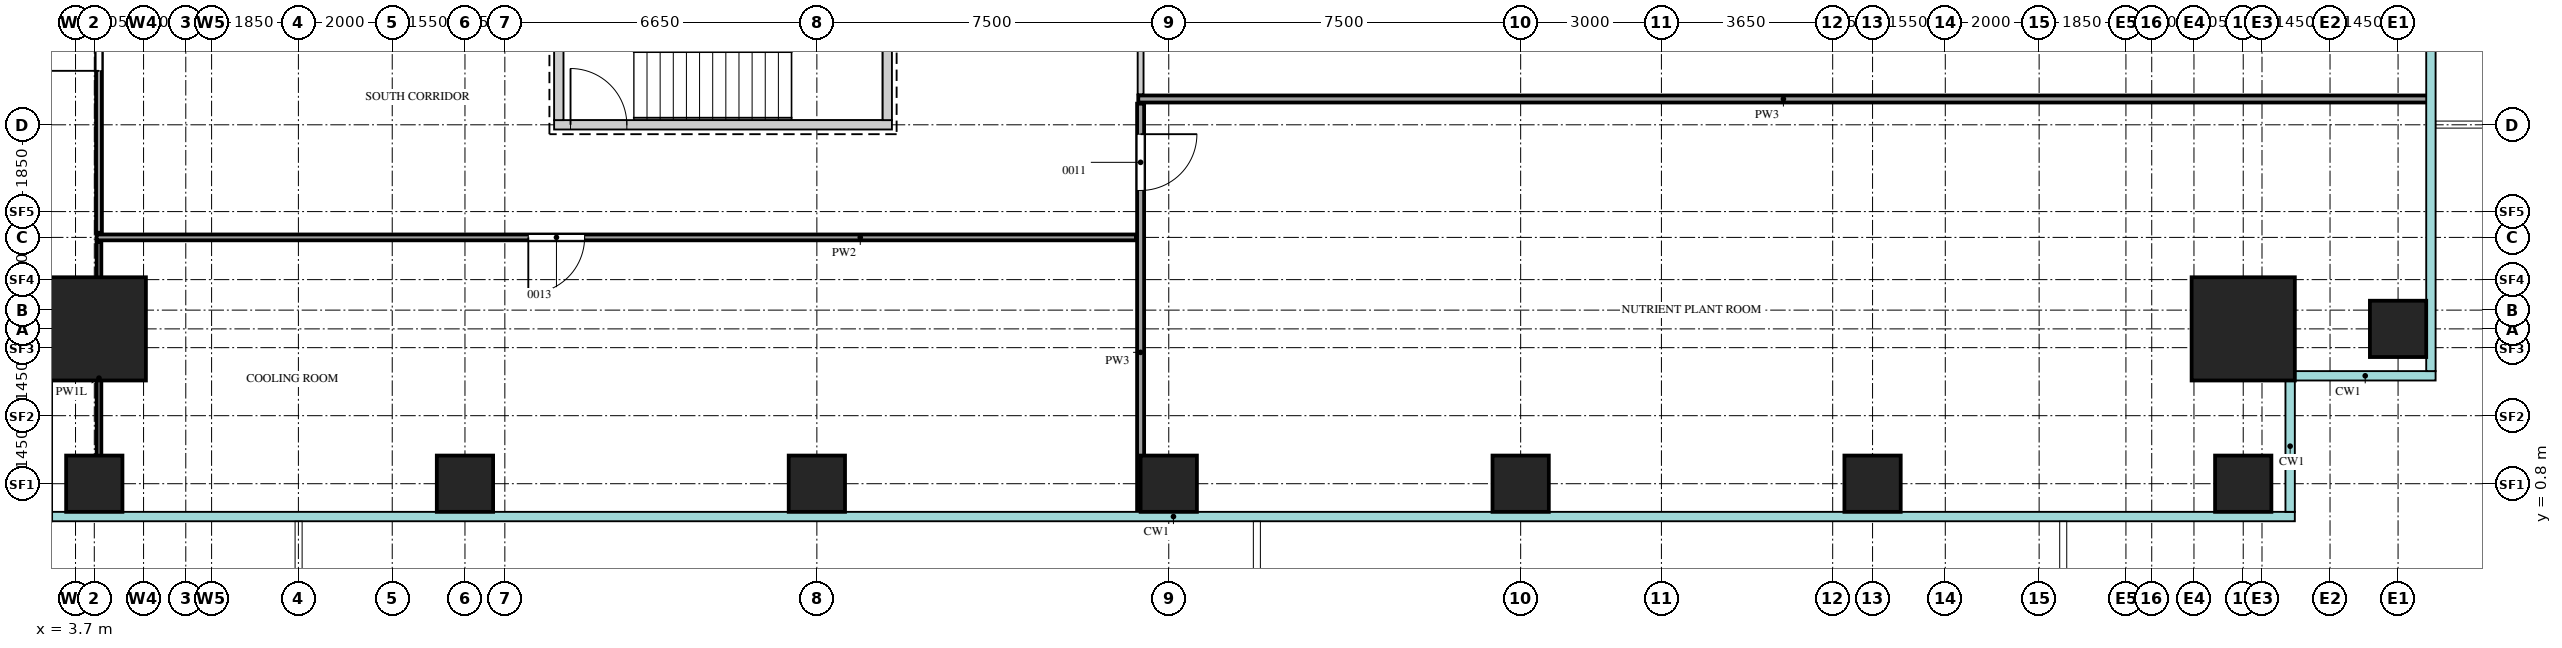
"""IFC4 building model, lengths in metres.
Left out: names, types, materials, properties, quantities, classifications, styles, units other than length and angle.
Written with IfcOpenShell. Run it as: python <this file> out.ifc"""

import sys

from ifc_helpers import new_model, si_unit, direction, frame, frame_2d, origin, origin_2d, place, context, subcontext, project, spatial, rectangle, extrude, source, transform, mapped, element, fill, save


model = new_model("IFC4")
c1 = context("Model", 3, precision=1e-05, world=origin(), true_north=direction((0.0, 1.0)))
c2 = subcontext(c1, "Body", "Model", "MODEL_VIEW")
j1 = project(units=[si_unit("LENGTHUNIT", "METRE"), si_unit("PLANEANGLEUNIT", "RADIAN")], contexts=[c1])
p1 = place(None, origin())
s1 = spatial("IfcSite", under=j1, at=p1, CompositionType="ELEMENT")
p2 = place(p1, origin())
s2 = spatial("IfcBuilding", under=s1, at=p2, CompositionType="ELEMENT")
p3 = place(p2, frame((0.0, 0.0, 82.5)))
s3 = spatial("IfcBuildingStorey", under=s2, at=p3, CompositionType="ELEMENT", Elevation=82.5)
m1 = source(origin(), c2, "Body", "SweptSolid", [
    extrude(rectangle(XDim=7.2, YDim=0.2, at=frame_2d((3.6, 0.0))), origin(), (0.0, 0.0, 1.0), 4.2),
])
p4 = place(p3, frame((13.9, 8.45, 0.0), z_axis=(0.0, 0.0, 1.0), x_axis=(1.0, 0.0, 0.0)))
e1 = element("IfcWall", 1, at=p4, inside=s3, PredefinedType="SHEAR", context=c2, shape_type="MappedRepresentation", body=[
    mapped(m1, transform((0.0, 0.0, 0.0))),
])
m2 = source(origin(), c2, "Body", "SweptSolid", [
    extrude(rectangle(XDim=1.2, YDim=2.1, at=frame_2d((0.6, 1.05))), frame((0.0, 0.11, 0.0), z_axis=(0.0, -1.0, 0.0), x_axis=(1.0, 0.0, 0.0)), (0.0, 0.0, 1.0), 0.22),
])
p5 = place(p4, frame((0.35, 0.0, 0.0)))
e2 = element("IfcOpeningElement", 2, at=p5, cuts=e1, PredefinedType="OPENING", context=c2, shape_type="MappedRepresentation", body=[
    mapped(m2, transform((0.0, 0.0, 0.0))),
])
m3 = source(origin(), c2, "Body", "SweptSolid", [
    extrude(rectangle(XDim=3.35, YDim=0.2, at=frame_2d((1.675, 0.0))), origin(), (0.0, 0.0, 1.0), 4.2),
])
for number, where, z_axis, x_axis in (
    (3, (21.0, 8.55, 0.0), (0.0, 0.0, 1.0), (0.0, 1.0, 0.0)),
    (4, (14.0, 8.55, 0.0), (0.0, 0.0, 1.0), (0.0, 1.0, 0.0)),
):
    element("IfcWall", number, at=place(p3, frame(where, z_axis=z_axis, x_axis=x_axis)), inside=s3, PredefinedType="SHEAR", context=c2, shape_type="MappedRepresentation", body=[
        mapped(m3, transform((0.0, 0.0, 0.0))),
    ])
m4 = source(origin(), c2, "Body", "SweptSolid", [
    extrude(rectangle(XDim=2.2, YDim=2.2, at=origin_2d()), origin(), (0.0, 0.0, 1.0), 4.5),
])
for number, where, z_axis, x_axis in (
    (5, (49.9, 4.1, 0.0), (0.0, 0.0, 1.0), (1.0, 0.0, 0.0)),
    (6, (4.1, 4.1, 0.0), (0.0, 0.0, 1.0), (1.0, 0.0, 0.0)),
):
    element("IfcColumn", number, at=place(p3, frame(where, z_axis=z_axis, x_axis=x_axis)), inside=s3, PredefinedType="COLUMN", context=c2, shape_type="MappedRepresentation", body=[
        mapped(m4, transform((0.0, 0.0, 0.0))),
    ])
m5 = source(origin(), c2, "Body", "SweptSolid", [
    extrude(rectangle(XDim=1.2, YDim=1.2, at=origin_2d()), origin(), (0.0, 0.0, 1.0), 4.2),
])
for number, where, z_axis, x_axis in (
    (7, (4.1, 0.8, 0.0), (0.0, 0.0, 1.0), (1.0, 0.0, 0.0)),
    (8, (12.0, 0.8, 0.0), (0.0, 0.0, 1.0), (1.0, 0.0, 0.0)),
    (9, (19.5, 0.8, 0.0), (0.0, 0.0, 1.0), (1.0, 0.0, 0.0)),
    (10, (27.0, 0.8, 0.0), (0.0, 0.0, 1.0), (1.0, 0.0, 0.0)),
    (11, (34.5, 0.8, 0.0), (0.0, 0.0, 1.0), (1.0, 0.0, 0.0)),
    (12, (42.0, 0.8, 0.0), (0.0, 0.0, 1.0), (1.0, 0.0, 0.0)),
    (13, (49.9, 0.8, 0.0), (0.0, 0.0, 1.0), (1.0, 0.0, 0.0)),
    (14, (53.2, 4.1, 0.0), (0.0, 0.0, 1.0), (1.0, 0.0, 0.0)),
):
    element("IfcColumn", number, at=place(p3, frame(where, z_axis=z_axis, x_axis=x_axis)), inside=s3, PredefinedType="COLUMN", context=c2, shape_type="MappedRepresentation", body=[
        mapped(m5, transform((0.0, 0.0, 0.0))),
    ])
m6 = source(origin(), c2, "Body", "SweptSolid", [
    extrude(rectangle(XDim=5.8, YDim=0.1, at=frame_2d((2.9, 0.0))), origin(), (0.0, 0.0, 1.0), 3.6),
])
p6 = place(p3, frame((4.2, 0.15, 0.0), z_axis=(0.0, 0.0, 1.0), x_axis=(0.0, 1.0, 0.0)))
e15 = element("IfcWall", 15, at=p6, inside=s3, PredefinedType="PARTITIONING", context=c2, shape_type="MappedRepresentation", body=[
    mapped(m6, transform((0.0, 0.0, 0.0))),
])
m7 = source(origin(), c2, "Body", "SweptSolid", [
    extrude(rectangle(XDim=8.75, YDim=0.15, at=frame_2d((4.375, 0.0))), origin(), (0.0, 0.0, 1.0), 4.3),
])
p7 = place(p3, frame((26.4, 0.15, 0.0), z_axis=(0.0, 0.0, 1.0), x_axis=(0.0, 1.0, 0.0)))
e16 = element("IfcWall", 16, at=p7, inside=s3, PredefinedType="PARTITIONING", context=c2, shape_type="MappedRepresentation", body=[
    mapped(m7, transform((0.0, 0.0, 0.0))),
])
m8 = source(origin(), c2, "Body", "SweptSolid", [
    extrude(rectangle(XDim=1.2, YDim=2.1, at=frame_2d((0.6, 1.05))), frame((0.0, 0.085, 0.0), z_axis=(0.0, -1.0, 0.0), x_axis=(1.0, 0.0, 0.0)), (0.0, 0.0, 1.0), 0.17),
])
p8 = place(p7, frame((6.9, 0.0, 0.0)))
e17 = element("IfcOpeningElement", 17, at=p8, cuts=e16, PredefinedType="OPENING", context=c2, shape_type="MappedRepresentation", body=[
    mapped(m8, transform((0.0, 0.0, 0.0))),
])
m9 = source(origin(), c2, "Body", "SweptSolid", [
    extrude(rectangle(XDim=22.15, YDim=0.125, at=frame_2d((11.075, 0.0))), origin(), (0.0, 0.0, 1.0), 4.3),
])
p9 = place(p3, frame((4.15, 6.05, 0.0), z_axis=(0.0, 0.0, 1.0), x_axis=(1.0, 0.0, 0.0)))
e18 = element("IfcWall", 18, at=p9, inside=s3, PredefinedType="PARTITIONING", context=c2, shape_type="MappedRepresentation", body=[
    mapped(m9, transform((0.0, 0.0, 0.0))),
])
m10 = source(origin(), c2, "Body", "SweptSolid", [
    extrude(rectangle(XDim=1.2, YDim=2.1, at=frame_2d((0.6, 1.05))), frame((0.0, 0.073, 0.0), z_axis=(0.0, -1.0, 0.0), x_axis=(1.0, 0.0, 0.0)), (0.0, 0.0, 1.0), 0.145),
])
p10 = place(p9, frame((9.2, 0.0, 0.0)))
e19 = element("IfcOpeningElement", 19, at=p10, cuts=e18, PredefinedType="OPENING", context=c2, shape_type="MappedRepresentation", body=[
    mapped(m10, transform((0.0, 0.0, 0.0))),
])
m11 = source(origin(), c2, "Body", "SweptSolid", [
    extrude(rectangle(XDim=41.8, YDim=0.125, at=frame_2d((20.9, 0.0))), origin(), (0.0, 0.0, 1.0), 4.3),
])
p11 = place(p3, frame((4.2, 6.15, 0.0), z_axis=(0.0, 0.0, 1.0), x_axis=(0.0, 1.0, 0.0)))
e20 = element("IfcWall", 20, at=p11, inside=s3, PredefinedType="PARTITIONING", context=c2, shape_type="MappedRepresentation", body=[
    mapped(m11, transform((0.0, 0.0, 0.0))),
])
p12 = place(p11, frame((3.45, 0.0, 0.0)))
e21 = element("IfcOpeningElement", 21, at=p12, cuts=e20, PredefinedType="OPENING", context=c2, shape_type="MappedRepresentation", body=[
    mapped(m10, transform((0.0, 0.0, 0.0))),
])
m12 = source(origin(), c2, "Body", "SweptSolid", [
    extrude(rectangle(XDim=0.9, YDim=2.1, at=frame_2d((0.45, 1.05))), frame((0.0, 0.073, 0.0), z_axis=(0.0, -1.0, 0.0), x_axis=(1.0, 0.0, 0.0)), (0.0, 0.0, 1.0), 0.145),
])
p13 = place(p11, frame((13.25, 0.0, 0.0)))
e22 = element("IfcOpeningElement", 22, at=p13, cuts=e20, PredefinedType="OPENING", context=c2, shape_type="MappedRepresentation", body=[
    mapped(m12, transform((0.0, 0.0, 0.0))),
])
p14 = place(p11, frame((30.35, 0.0, 0.0)))
e23 = element("IfcOpeningElement", 23, at=p14, cuts=e20, PredefinedType="OPENING", context=c2, shape_type="MappedRepresentation", body=[
    mapped(m12, transform((0.0, 0.0, 0.0))),
])
m13 = source(origin(), c2, "Body", "SweptSolid", [
    extrude(rectangle(XDim=27.5, YDim=0.15, at=frame_2d((13.75, 0.0))), origin(), (0.0, 0.0, 1.0), 4.3),
])
p15 = place(p3, frame((26.35, 9.0, 0.0), z_axis=(0.0, 0.0, 1.0), x_axis=(1.0, 0.0, 0.0)))
e24 = element("IfcWall", 24, at=p15, inside=s3, PredefinedType="PARTITIONING", context=c2, shape_type="MappedRepresentation", body=[
    mapped(m13, transform((0.0, 0.0, 0.0))),
])
m14 = source(origin(), c2, "Body", "SweptSolid", [
    extrude(rectangle(XDim=26.1, YDim=0.125, at=frame_2d((13.05, 0.0))), origin(), (0.0, 0.0, 1.0), 4.3),
])
p16 = place(p3, frame((26.4, 9.1, 0.0), z_axis=(0.0, 0.0, 1.0), x_axis=(0.0, 1.0, 0.0)))
e25 = element("IfcWall", 25, at=p16, inside=s3, PredefinedType="PARTITIONING", context=c2, shape_type="MappedRepresentation", body=[
    mapped(m14, transform((0.0, 0.0, 0.0))),
])
p17 = place(p16, frame((5.8, 0.0, 0.0)))
e26 = element("IfcOpeningElement", 26, at=p17, cuts=e25, PredefinedType="OPENING", context=c2, shape_type="MappedRepresentation", body=[
    mapped(m10, transform((0.0, 0.0, 0.0))),
])
m15 = source(origin(), c2, "Body", "SweptSolid", [
    extrude(rectangle(XDim=1.2, YDim=2.1, at=frame_2d((0.6, 1.05))), frame((0.0, 0.025, 0.0), z_axis=(0.0, -1.0, 0.0), x_axis=(1.0, 0.0, 0.0)), (0.0, 0.0, 1.0), 0.05),
])
p18 = place(p8, origin())
e27 = element("IfcDoor", 27, at=p18, inside=s3, OperationType="SINGLE_SWING_RIGHT", PredefinedType="DOOR", context=c2, shape_type="MappedRepresentation", body=[
    mapped(m15, transform((0.0, 0.0, 0.0))),
])
fill(e17, e27)
p19 = place(p12, origin())
e28 = element("IfcDoor", 28, at=p19, inside=s3, OperationType="SINGLE_SWING_RIGHT", PredefinedType="DOOR", context=c2, shape_type="MappedRepresentation", body=[
    mapped(m15, transform((0.0, 0.0, 0.0))),
])
fill(e21, e28)
p20 = place(p10, origin())
e29 = element("IfcDoor", 29, at=p20, inside=s3, OperationType="SINGLE_SWING_LEFT", PredefinedType="DOOR", context=c2, shape_type="MappedRepresentation", body=[
    mapped(m15, transform((0.0, 0.0, 0.0))),
])
fill(e19, e29)
p21 = place(p5, origin())
e30 = element("IfcDoor", 30, at=p21, inside=s3, OperationType="SINGLE_SWING_RIGHT", PredefinedType="DOOR", context=c2, shape_type="MappedRepresentation", body=[
    mapped(m15, transform((0.0, 0.0, 0.0))),
])
fill(e2, e30)
save(model, sys.argv[1])
